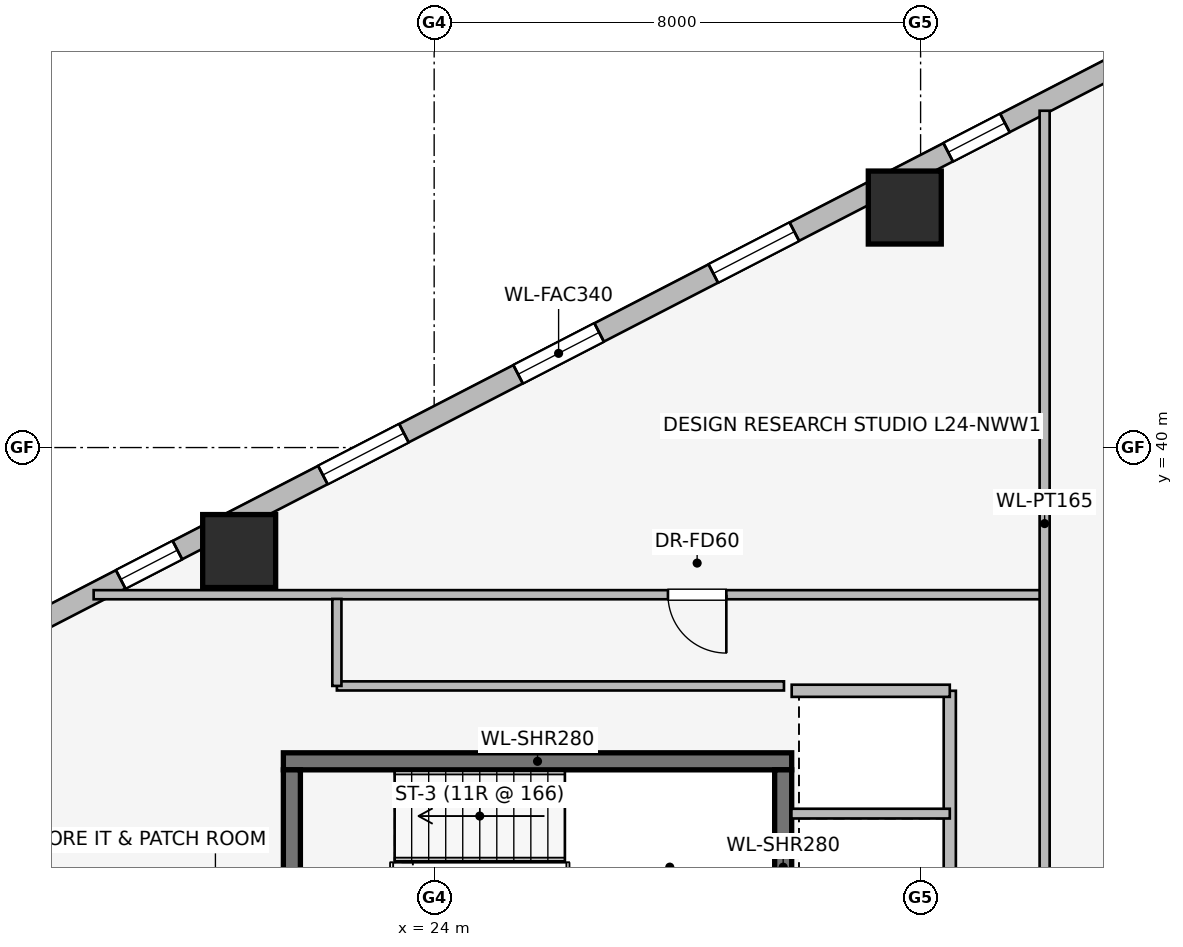
"""IFC4 building model, lengths in metres.
Left out: names, types, materials, properties, quantities, classifications, styles, units other than length and angle.
Written with IfcOpenShell. Run it as: python <this file> out.ifc"""

import sys

from ifc_helpers import new_model, si_unit, direction, frame, frame_2d, origin, origin_2d, place, context, subcontext, project, spatial, rectangle, extrude, element, fill, save


model = new_model("IFC4")
c1 = context("Model", 3, precision=1e-05, world=origin(), true_north=direction((0.0, 1.0)))
c2 = subcontext(c1, "Body", "Model", "MODEL_VIEW")
j1 = project(units=[si_unit("LENGTHUNIT", "METRE"), si_unit("PLANEANGLEUNIT", "RADIAN")], contexts=[c1])
p1 = place(None, origin())
s1 = spatial("IfcSite", under=j1, at=p1, CompositionType="ELEMENT")
p2 = place(p1, origin())
s2 = spatial("IfcBuilding", under=s1, at=p2, CompositionType="ELEMENT")
p3 = place(p2, frame((0.0, 0.0, 92.7)))
s3 = spatial("IfcBuildingStorey", under=s2, at=p3, CompositionType="ELEMENT", Elevation=92.7)
p4 = place(p3, frame((29.88, 34.84, 0.0), z_axis=(0.0, 0.0, 1.0), x_axis=(-1.0, 0.0, 0.0)))
e1 = element("IfcWall", 1, at=p4, inside=s3, PredefinedType="SHEAR", context=c2, shape_type="SweptSolid", body=[
    extrude(rectangle(XDim=8.36, YDim=0.28, at=frame_2d((4.18, 0.0))), origin(), (0.0, 0.0, 1.0), 3.65),
])
for number, where, z_axis, x_axis in (
    (2, (21.66, 34.7, 0.0), (0.0, 0.0, 1.0), (0.0, -1.0, 0.0)),
    (3, (29.74, 31.5, 0.0), (0.0, 0.0, 1.0), (0.0, 1.0, 0.0)),
):
    element("IfcWall", number, at=place(p3, frame(where, z_axis=z_axis, x_axis=x_axis)), inside=s3, PredefinedType="SHEAR", context=c2, shape_type="SweptSolid", body=[
        extrude(rectangle(XDim=3.2, YDim=0.28, at=frame_2d((1.6, 0.0))), origin(), (0.0, 0.0, 1.0), 3.65),
    ])
for number, where, z_axis, x_axis in (
    (4, (31.74, 43.947, 0.0), (0.0, 0.0, 1.0), (1.0, 0.0, 0.0)),
    (5, (20.793, 38.298, 0.0), (0.0, 0.0, 1.0), (1.0, 0.0, 0.0)),
):
    element("IfcColumn", number, at=place(p3, frame(where, z_axis=z_axis, x_axis=x_axis)), inside=s3, PredefinedType="COLUMN", context=c2, shape_type="SweptSolid", body=[
        extrude(rectangle(XDim=1.2, YDim=1.2, at=origin_2d()), origin(), (0.0, 0.0, 1.0), 3.65),
    ])
p5 = place(p3, frame((16.924, 36.841, 0.0), z_axis=(0.0, 0.0, 1.0), x_axis=(0.888634413993, 0.458616264721, 0.0)))
e6 = element("IfcWall", 6, at=p5, inside=s3, PredefinedType="STANDARD", context=c2, shape_type="SweptSolid", body=[
    extrude(rectangle(XDim=20.531, YDim=0.34, at=frame_2d((10.266, 0.0))), origin(), (0.0, 0.0, 1.0), 2.634),
])
p6 = place(p5, frame((2.161, 0.0, 0.75)))
e7 = element("IfcOpeningElement", 7, at=p6, cuts=e6, PredefinedType="OPENING", context=c2, shape_type="SweptSolid", body=[
    extrude(rectangle(XDim=1.05, YDim=1.4, at=frame_2d((0.525, 0.7))), frame((0.0, 0.18, 0.0), z_axis=(0.0, -1.0, 0.0), x_axis=(1.0, 0.0, 0.0)), (0.0, 0.0, 1.0), 0.36),
])
p7 = place(p5, frame((5.903, 0.0, 0.75)))
e8 = element("IfcOpeningElement", 8, at=p7, cuts=e6, PredefinedType="OPENING", context=c2, shape_type="SweptSolid", body=[
    extrude(rectangle(XDim=1.5, YDim=1.5, at=frame_2d((0.75, 0.75))), frame((0.0, 0.18, 0.0), z_axis=(0.0, -1.0, 0.0), x_axis=(1.0, 0.0, 0.0)), (0.0, 0.0, 1.0), 0.36),
])
p8 = place(p5, frame((9.516, 0.0, 0.75)))
e9 = element("IfcOpeningElement", 9, at=p8, cuts=e6, PredefinedType="OPENING", context=c2, shape_type="SweptSolid", body=[
    extrude(rectangle(XDim=1.5, YDim=1.5, at=frame_2d((0.75, 0.75))), frame((0.0, 0.18, 0.0), z_axis=(0.0, -1.0, 0.0), x_axis=(1.0, 0.0, 0.0)), (0.0, 0.0, 1.0), 0.36),
])
p9 = place(p5, frame((13.129, 0.0, 0.75)))
e10 = element("IfcOpeningElement", 10, at=p9, cuts=e6, PredefinedType="OPENING", context=c2, shape_type="SweptSolid", body=[
    extrude(rectangle(XDim=1.5, YDim=1.5, at=frame_2d((0.75, 0.75))), frame((0.0, 0.18, 0.0), z_axis=(0.0, -1.0, 0.0), x_axis=(1.0, 0.0, 0.0)), (0.0, 0.0, 1.0), 0.36),
])
p10 = place(p5, frame((17.476, 0.0, 0.75)))
e11 = element("IfcOpeningElement", 11, at=p10, cuts=e6, PredefinedType="OPENING", context=c2, shape_type="SweptSolid", body=[
    extrude(rectangle(XDim=1.05, YDim=1.4, at=frame_2d((0.525, 0.7))), frame((0.0, 0.18, 0.0), z_axis=(0.0, -1.0, 0.0), x_axis=(1.0, 0.0, 0.0)), (0.0, 0.0, 1.0), 0.36),
])
p11 = place(p3, frame((32.48, 31.95, 0.0), z_axis=(0.0, 0.0, 1.0), x_axis=(0.0, 1.0, 0.0)))
e12 = element("IfcWall", 12, at=p11, inside=s3, PredefinedType="PARTITIONING", context=c2, shape_type="SweptSolid", body=[
    extrude(rectangle(XDim=4.05, YDim=0.2, at=frame_2d((2.025, 0.0))), origin(), (0.0, 0.0, 1.0), 2.463),
])
p12 = place(p3, frame((29.88, 36.0, 0.0), z_axis=(0.0, 0.0, 1.0), x_axis=(1.0, 0.0, 0.0)))
e13 = element("IfcWall", 13, at=p12, inside=s3, PredefinedType="PARTITIONING", context=c2, shape_type="SweptSolid", body=[
    extrude(rectangle(XDim=2.6, YDim=0.2, at=frame_2d((1.3, 0.0))), origin(), (0.0, 0.0, 1.0), 3.34),
])
p13 = place(p3, frame((29.875, 33.98, 0.0), z_axis=(0.0, 0.0, 1.0), x_axis=(1.0, 0.0, 0.0)))
e14 = element("IfcWall", 14, at=p13, inside=s3, PredefinedType="PARTITIONING", context=c2, shape_type="SweptSolid", body=[
    extrude(rectangle(XDim=2.605, YDim=0.16, at=frame_2d((1.302, 0.0))), origin(), (0.0, 0.0, 1.0), 3.34),
])
p14 = place(p3, frame((34.0, 37.58, 0.0), z_axis=(0.0, 0.0, 1.0), x_axis=(-1.0, 0.0, 0.0)))
e15 = element("IfcWall", 15, at=p14, inside=s3, PredefinedType="PARTITIONING", context=c2, shape_type="SweptSolid", body=[
    extrude(rectangle(XDim=15.6, YDim=0.15, at=frame_2d((7.8, 0.0))), origin(), (0.0, 0.0, 1.0), 3.34),
])
p15 = place(p14, frame((5.195, 0.0, 0.0)))
e16 = element("IfcOpeningElement", 16, at=p15, cuts=e15, PredefinedType="OPENING", context=c2, shape_type="SweptSolid", body=[
    extrude(rectangle(XDim=0.96, YDim=2.0, at=frame_2d((0.48, 1.0))), frame((0.0, 0.085, 0.0), z_axis=(0.0, -1.0, 0.0), x_axis=(1.0, 0.0, 0.0)), (0.0, 0.0, 1.0), 0.17),
])
p16 = place(p3, frame((34.04, 31.96, 0.0), z_axis=(0.0, 0.0, 1.0), x_axis=(0.0, 1.0, 0.0)))
e17 = element("IfcWall", 17, at=p16, inside=s3, PredefinedType="PARTITIONING", context=c2, shape_type="SweptSolid", body=[
    extrude(rectangle(XDim=13.579, YDim=0.165, at=frame_2d((6.79, 0.0))), origin(), (0.0, 0.0, 1.0), 3.34),
])
p17 = place(p3, frame((29.753, 36.08, 0.0), z_axis=(0.0, 0.0, 1.0), x_axis=(-1.0, 0.0, 0.0)))
e18 = element("IfcWall", 18, at=p17, inside=s3, PredefinedType="PARTITIONING", context=c2, shape_type="SweptSolid", body=[
    extrude(rectangle(XDim=7.353, YDim=0.15, at=frame_2d((3.677, 0.0))), origin(), (0.0, 0.0, 1.0), 3.34),
])
p18 = place(p3, frame((22.4, 36.08, 0.0), z_axis=(0.0, 0.0, 1.0), x_axis=(0.0, 1.0, 0.0)))
e19 = element("IfcWall", 19, at=p18, inside=s3, PredefinedType="PARTITIONING", context=c2, shape_type="SweptSolid", body=[
    extrude(rectangle(XDim=1.43, YDim=0.15, at=frame_2d((0.715, 0.0))), origin(), (0.0, 0.0, 1.0), 3.34),
])
p19 = place(p6, origin())
e20 = element("IfcWindow", 20, at=p19, inside=s3, PartitioningType="SINGLE_PANEL", PredefinedType="WINDOW", context=c2, shape_type="SweptSolid", body=[
    extrude(rectangle(XDim=1.05, YDim=1.4, at=frame_2d((0.525, 0.7))), frame((0.0, 0.03, 0.0), z_axis=(0.0, -1.0, 0.0), x_axis=(1.0, 0.0, 0.0)), (0.0, 0.0, 1.0), 0.06),
])
fill(e7, e20)
p20 = place(p7, origin())
e21 = element("IfcWindow", 21, at=p20, inside=s3, PartitioningType="SINGLE_PANEL", PredefinedType="WINDOW", context=c2, shape_type="SweptSolid", body=[
    extrude(rectangle(XDim=1.5, YDim=1.5, at=frame_2d((0.75, 0.75))), frame((0.0, 0.03, 0.0), z_axis=(0.0, -1.0, 0.0), x_axis=(1.0, 0.0, 0.0)), (0.0, 0.0, 1.0), 0.06),
])
fill(e8, e21)
p21 = place(p8, origin())
e22 = element("IfcWindow", 22, at=p21, inside=s3, PartitioningType="SINGLE_PANEL", PredefinedType="WINDOW", context=c2, shape_type="SweptSolid", body=[
    extrude(rectangle(XDim=1.5, YDim=1.5, at=frame_2d((0.75, 0.75))), frame((0.0, 0.03, 0.0), z_axis=(0.0, -1.0, 0.0), x_axis=(1.0, 0.0, 0.0)), (0.0, 0.0, 1.0), 0.06),
])
fill(e9, e22)
p22 = place(p9, origin())
e23 = element("IfcWindow", 23, at=p22, inside=s3, PartitioningType="SINGLE_PANEL", PredefinedType="WINDOW", context=c2, shape_type="SweptSolid", body=[
    extrude(rectangle(XDim=1.5, YDim=1.5, at=frame_2d((0.75, 0.75))), frame((0.0, 0.03, 0.0), z_axis=(0.0, -1.0, 0.0), x_axis=(1.0, 0.0, 0.0)), (0.0, 0.0, 1.0), 0.06),
])
fill(e10, e23)
p23 = place(p10, origin())
e24 = element("IfcWindow", 24, at=p23, inside=s3, PartitioningType="SINGLE_PANEL", PredefinedType="WINDOW", context=c2, shape_type="SweptSolid", body=[
    extrude(rectangle(XDim=1.05, YDim=1.4, at=frame_2d((0.525, 0.7))), frame((0.0, 0.03, 0.0), z_axis=(0.0, -1.0, 0.0), x_axis=(1.0, 0.0, 0.0)), (0.0, 0.0, 1.0), 0.06),
])
fill(e11, e24)
p24 = place(p15, origin())
e25 = element("IfcDoor", 25, at=p24, inside=s3, OperationType="SINGLE_SWING_LEFT", PredefinedType="DOOR", context=c2, shape_type="SweptSolid", body=[
    extrude(rectangle(XDim=0.96, YDim=2.0, at=frame_2d((0.48, 1.0))), frame((0.0, 0.025, 0.0), z_axis=(0.0, -1.0, 0.0), x_axis=(1.0, 0.0, 0.0)), (0.0, 0.0, 1.0), 0.05),
])
fill(e16, e25)
save(model, sys.argv[1])
